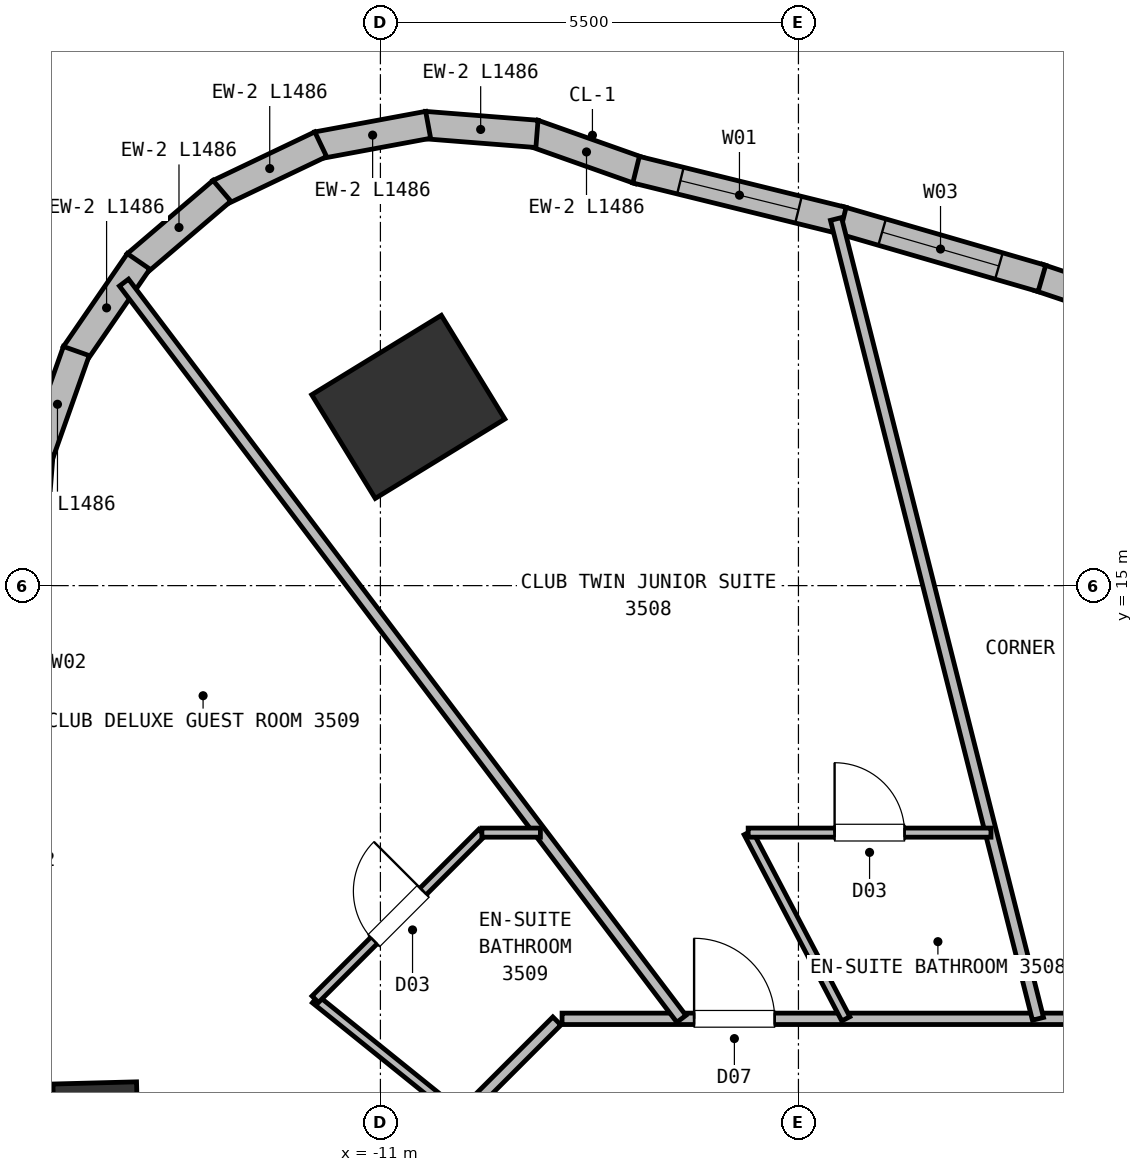
"""IFC4 building model, lengths in metres.
Left out: names, types, materials, properties, quantities, classifications, styles, units other than length and angle.
Written with IfcOpenShell. Run it as: python <this file> out.ifc"""

import sys

from ifc_helpers import new_model, si_unit, direction, frame, frame_2d, origin, origin_2d, place, context, subcontext, project, spatial, rectangle, extrude, element, fill, save


model = new_model("IFC4")
c1 = context("Model", 3, precision=1e-05, world=origin(), true_north=direction((0.0, 1.0)))
c2 = subcontext(c1, "Body", "Model", "MODEL_VIEW")
j1 = project(units=[si_unit("LENGTHUNIT", "METRE"), si_unit("PLANEANGLEUNIT", "RADIAN")], contexts=[c1])
p1 = place(None, origin())
s1 = spatial("IfcSite", under=j1, at=p1, CompositionType="ELEMENT")
p2 = place(p1, origin())
s2 = spatial("IfcBuilding", under=s1, at=p2, CompositionType="ELEMENT")
p3 = place(p2, frame((0.0, 0.0, 131.0)))
s3 = spatial("IfcBuildingStorey", under=s2, at=p3, CompositionType="ELEMENT", Elevation=131.0)
p4 = place(p3, frame((-10.633, 17.352, 0.0), z_axis=(0.0, 0.0, 1.0), x_axis=(-0.522498564716, 0.852640164354, 0.0)))
e1 = element("IfcColumn", 1, at=p4, inside=s3, PredefinedType="COLUMN", context=c2, shape_type="SweptSolid", body=[
    extrude(rectangle(XDim=1.6, YDim=2.0, at=origin_2d()), origin(), (0.0, 0.0, 1.0), 3.75),
])
p5 = place(p3, frame((-14.747, 8.007, 0.0), z_axis=(0.0, 0.0, 1.0), x_axis=(-0.026176948308, 0.999657324976, 0.0)))
e2 = element("IfcColumn", 2, at=p5, inside=s3, PredefinedType="COLUMN", context=c2, shape_type="SweptSolid", body=[
    extrude(rectangle(XDim=0.9, YDim=1.1, at=origin_2d()), origin(), (0.0, 0.0, 1.0), 3.75),
])
for number, where, z_axis, x_axis in (
    (3, (-8.989, 20.954, 0.0), (0.0, 0.0, 1.0), (0.943, -0.334, 0.0)),
    (4, (-10.421, 21.061, 0.0), (0.0, 0.0, 1.0), (0.997, -0.079, 0.0)),
):
    element("IfcWall", number, at=place(p3, frame(where, z_axis=z_axis, x_axis=x_axis)), inside=s3, PredefinedType="SOLIDWALL", context=c2, shape_type="SweptSolid", body=[
        extrude(rectangle(XDim=1.486, YDim=0.36, at=frame_2d((0.743, 0.0))), origin(), (0.0, 0.0, 1.0), 3.5),
    ])
p6 = place(p3, frame((-11.833, 20.792, 0.0), z_axis=(0.0, 0.0, 1.0), x_axis=(0.983262389335, 0.182195152844, 0.0)))
e5 = element("IfcWall", 5, at=p6, inside=s3, PredefinedType="SOLIDWALL", context=c2, shape_type="SweptSolid", body=[
    extrude(rectangle(XDim=1.486, YDim=0.36, at=frame_2d((0.743, 0.0))), origin(), (0.0, 0.0, 1.0), 3.5),
])
for number, where, z_axis, x_axis in (
    (6, (-13.127, 20.168, 0.0), (0.0, 0.0, 1.0), (0.903, 0.431, 0.0)),
    (7, (-14.215, 19.23, 0.0), (0.0, 0.0, 1.0), (0.76, 0.649, 0.0)),
):
    element("IfcWall", number, at=place(p3, frame(where, z_axis=z_axis, x_axis=x_axis)), inside=s3, PredefinedType="SOLIDWALL", context=c2, shape_type="SweptSolid", body=[
        extrude(rectangle(XDim=1.486, YDim=0.36, at=frame_2d((0.743, 0.0))), origin(), (0.0, 0.0, 1.0), 3.5),
    ])
p7 = place(p3, frame((-15.023, 18.042, 0.0), z_axis=(0.0, 0.0, 1.0), x_axis=(0.566438155808, 0.824104250472, 0.0)))
e8 = element("IfcWall", 8, at=p7, inside=s3, PredefinedType="SOLIDWALL", context=c2, shape_type="SweptSolid", body=[
    extrude(rectangle(XDim=1.486, YDim=0.36, at=frame_2d((0.743, 0.0))), origin(), (0.0, 0.0, 1.0), 3.5),
])
p8 = place(p3, frame((-15.497, 16.686, 0.0), z_axis=(0.0, 0.0, 1.0), x_axis=(0.333670746008, 0.942689680254, 0.0)))
e9 = element("IfcWall", 9, at=p8, inside=s3, PredefinedType="SOLIDWALL", context=c2, shape_type="SweptSolid", body=[
    extrude(rectangle(XDim=1.486, YDim=0.36, at=frame_2d((0.743, 0.0))), origin(), (0.0, 0.0, 1.0), 3.5),
])
p9 = place(p3, frame((-15.603, 15.253, 0.0), z_axis=(0.0, 0.0, 1.0), x_axis=(0.078393018091, 0.996922531952, 0.0)))
e10 = element("IfcWall", 10, at=p9, inside=s3, PredefinedType="SOLIDWALL", context=c2, shape_type="SweptSolid", body=[
    extrude(rectangle(XDim=1.486, YDim=0.36, at=frame_2d((0.743, 0.0))), origin(), (0.0, 0.0, 1.0), 3.5),
])
p10 = place(p3, frame((-2.344, 19.057, 0.0), z_axis=(0.0, 0.0, 1.0), x_axis=(0.948124259455, -0.317899966393, 0.0)))
e11 = element("IfcWall", 11, at=p10, inside=s3, PredefinedType="SOLIDWALL", context=c2, shape_type="SweptSolid", body=[
    extrude(rectangle(XDim=2.759, YDim=0.36, at=frame_2d((1.379, 0.0))), origin(), (0.0, 0.0, 1.0), 3.5),
])
p11 = place(p10, frame((0.579, 0.0, 0.72)))
e12 = element("IfcOpeningElement", 12, at=p11, cuts=e11, PredefinedType="OPENING", context=c2, shape_type="SweptSolid", body=[
    extrude(rectangle(XDim=1.6, YDim=1.88, at=frame_2d((0.8, 0.94))), frame((0.0, 0.19, 0.0), z_axis=(0.0, -1.0, 0.0), x_axis=(1.0, 0.0, 0.0)), (0.0, 0.0, 1.0), 0.38),
])
p12 = place(p3, frame((-4.964, 19.815, 0.0), z_axis=(0.0, 0.0, 1.0), x_axis=(0.960441835692, -0.278480664056, 0.0)))
e13 = element("IfcWall", 13, at=p12, inside=s3, PredefinedType="SOLIDWALL", context=c2, shape_type="SweptSolid", body=[
    extrude(rectangle(XDim=2.777, YDim=0.36, at=frame_2d((1.389, 0.0))), origin(), (0.0, 0.0, 1.0), 3.5),
])
p13 = place(p12, frame((0.589, 0.0, 0.72)))
e14 = element("IfcOpeningElement", 14, at=p13, cuts=e13, PredefinedType="OPENING", context=c2, shape_type="SweptSolid", body=[
    extrude(rectangle(XDim=1.6, YDim=1.88, at=frame_2d((0.8, 0.94))), frame((0.0, 0.19, 0.0), z_axis=(0.0, -1.0, 0.0), x_axis=(1.0, 0.0, 0.0)), (0.0, 0.0, 1.0), 0.38),
])
p14 = place(p3, frame((-7.636, 20.472, 0.0), z_axis=(0.0, 0.0, 1.0), x_axis=(0.970982505779, -0.239150524716, 0.0)))
e15 = element("IfcWall", 15, at=p14, inside=s3, PredefinedType="SOLIDWALL", context=c2, shape_type="SweptSolid", body=[
    extrude(rectangle(XDim=2.801, YDim=0.36, at=frame_2d((1.401, 0.0))), origin(), (0.0, 0.0, 1.0), 3.5),
])
p15 = place(p14, frame((0.601, 0.0, 0.72)))
e16 = element("IfcOpeningElement", 16, at=p15, cuts=e15, PredefinedType="OPENING", context=c2, shape_type="SweptSolid", body=[
    extrude(rectangle(XDim=1.6, YDim=1.88, at=frame_2d((0.8, 0.94))), frame((0.0, 0.19, 0.0), z_axis=(0.0, -1.0, 0.0), x_axis=(1.0, 0.0, 0.0)), (0.0, 0.0, 1.0), 0.38),
])
p16 = place(p3, frame((-8.61, 9.3, 0.0), z_axis=(0.0, 0.0, 1.0), x_axis=(1.0, 0.0, 0.0)))
e17 = element("IfcWall", 17, at=p16, inside=s3, PredefinedType="PARTITIONING", context=c2, shape_type="SweptSolid", body=[
    extrude(rectangle(XDim=17.22, YDim=0.15, at=frame_2d((8.61, 0.0))), origin(), (0.0, 0.0, 1.0), 3.5),
])
p17 = place(p16, frame((11.156, 0.0, 0.0)))
e18 = element("IfcOpeningElement", 18, at=p17, cuts=e17, PredefinedType="OPENING", context=c2, shape_type="SweptSolid", body=[
    extrude(rectangle(XDim=1.0, YDim=2.15, at=frame_2d((0.5, 1.075))), frame((0.0, 0.085, 0.0), z_axis=(0.0, -1.0, 0.0), x_axis=(1.0, 0.0, 0.0)), (0.0, 0.0, 1.0), 0.17),
])
p18 = place(p16, frame((6.799, 0.0, 0.0)))
e19 = element("IfcOpeningElement", 19, at=p18, cuts=e17, PredefinedType="OPENING", context=c2, shape_type="SweptSolid", body=[
    extrude(rectangle(XDim=1.06, YDim=2.15, at=frame_2d((0.53, 1.075))), frame((0.0, 0.085, 0.0), z_axis=(0.0, -1.0, 0.0), x_axis=(1.0, 0.0, 0.0)), (0.0, 0.0, 1.0), 0.17),
])
p19 = place(p16, frame((1.737, 0.0, 0.0)))
e20 = element("IfcOpeningElement", 20, at=p19, cuts=e17, PredefinedType="OPENING", context=c2, shape_type="SweptSolid", body=[
    extrude(rectangle(XDim=1.06, YDim=2.15, at=frame_2d((0.53, 1.075))), frame((0.0, 0.085, 0.0), z_axis=(0.0, -1.0, 0.0), x_axis=(1.0, 0.0, 0.0)), (0.0, 0.0, 1.0), 0.17),
])
p20 = place(p16, frame((8.48, 0.0, 0.0)))
e21 = element("IfcOpeningElement", 21, at=p20, cuts=e17, PredefinedType="OPENING", context=c2, shape_type="SweptSolid", body=[
    extrude(rectangle(XDim=1.0, YDim=2.15, at=frame_2d((0.5, 1.075))), frame((0.0, 0.085, 0.0), z_axis=(0.0, -1.0, 0.0), x_axis=(1.0, 0.0, 0.0)), (0.0, 0.0, 1.0), 0.17),
])
p21 = place(p3, frame((-10.722, 7.228, 0.0), z_axis=(0.0, 0.0, 1.0), x_axis=(0.707106781187, 0.707106781187, 0.0)))
e22 = element("IfcWall", 22, at=p21, inside=s3, PredefinedType="PARTITIONING", context=c2, shape_type="SweptSolid", body=[
    extrude(rectangle(XDim=2.89, YDim=0.15, at=frame_2d((1.445, 0.0))), origin(), (0.0, 0.0, 1.0), 3.5),
])
p22 = place(p3, frame((-2.348, 9.3, 0.0), z_axis=(0.0, 0.0, 1.0), x_axis=(-0.244821157428, 0.969568254882, 0.0)))
e23 = element("IfcWall", 23, at=p22, inside=s3, PredefinedType="PARTITIONING", context=c2, shape_type="SweptSolid", body=[
    extrude(rectangle(XDim=10.855, YDim=0.15, at=frame_2d((5.427, 0.0))), origin(), (0.0, 0.0, 1.0), 3.5),
])
p23 = place(p3, frame((-6.161, 11.75, 0.0), z_axis=(0.0, 0.0, 1.0), x_axis=(0.464392787292, -0.885629346347, 0.0)))
e24 = element("IfcWall", 24, at=p23, inside=s3, PredefinedType="PARTITIONING", context=c2, shape_type="SweptSolid", body=[
    extrude(rectangle(XDim=2.766, YDim=0.12, at=frame_2d((1.383, 0.0))), origin(), (0.0, 0.0, 1.0), 3.5),
])
p24 = place(p3, frame((-6.161, 11.75, 0.0), z_axis=(0.0, 0.0, 1.0), x_axis=(1.0, 0.0, 0.0)))
e25 = element("IfcWall", 25, at=p24, inside=s3, PredefinedType="PARTITIONING", context=c2, shape_type="SweptSolid", body=[
    extrude(rectangle(XDim=3.194, YDim=0.12, at=frame_2d((1.597, 0.0))), origin(), (0.0, 0.0, 1.0), 3.5),
])
p25 = place(p24, frame((1.137, 0.0, 0.0)))
e26 = element("IfcOpeningElement", 26, at=p25, cuts=e25, PredefinedType="OPENING", context=c2, shape_type="SweptSolid", body=[
    extrude(rectangle(XDim=0.92, YDim=2.1, at=frame_2d((0.46, 1.05))), frame((0.0, 0.07, 0.0), z_axis=(0.0, -1.0, 0.0), x_axis=(1.0, 0.0, 0.0)), (0.0, 0.0, 1.0), 0.14),
])
p26 = place(p3, frame((-7.04, 9.3, 0.0), z_axis=(0.0, 0.0, 1.0), x_axis=(-0.603569047372, 0.797310733061, 0.0)))
e27 = element("IfcWall", 27, at=p26, inside=s3, PredefinedType="PARTITIONING", context=c2, shape_type="SweptSolid", body=[
    extrude(rectangle(XDim=12.15, YDim=0.15, at=frame_2d((6.075, 0.0))), origin(), (0.0, 0.0, 1.0), 3.5),
])
p27 = place(p3, frame((-11.857, 9.558, 0.0), z_axis=(0.0, 0.0, 1.0), x_axis=(0.778601964437, -0.627518112069, 0.0)))
e28 = element("IfcWall", 28, at=p27, inside=s3, PredefinedType="PARTITIONING", context=c2, shape_type="SweptSolid", body=[
    extrude(rectangle(XDim=2.464, YDim=0.12, at=frame_2d((1.232, 0.0))), origin(), (0.0, 0.0, 1.0), 3.5),
])
p28 = place(p3, frame((-11.857, 9.558, 0.0), z_axis=(0.0, 0.0, 1.0), x_axis=(0.7071461491, 0.707067411081, 0.0)))
e29 = element("IfcWall", 29, at=p28, inside=s3, PredefinedType="PARTITIONING", context=c2, shape_type="SweptSolid", body=[
    extrude(rectangle(XDim=3.101, YDim=0.12, at=frame_2d((1.55, 0.0))), origin(), (0.0, 0.0, 1.0), 3.5),
])
p29 = place(p28, frame((1.09, 0.0, 0.0)))
e30 = element("IfcOpeningElement", 30, at=p29, cuts=e29, PredefinedType="OPENING", context=c2, shape_type="SweptSolid", body=[
    extrude(rectangle(XDim=0.92, YDim=2.1, at=frame_2d((0.46, 1.05))), frame((0.0, 0.07, 0.0), z_axis=(0.0, -1.0, 0.0), x_axis=(1.0, 0.0, 0.0)), (0.0, 0.0, 1.0), 0.14),
])
p30 = place(p3, frame((-8.895, 11.75, 0.0), z_axis=(0.0, 0.0, 1.0), x_axis=(-1.0, 0.0, 0.0)))
e31 = element("IfcWall", 31, at=p30, inside=s3, PredefinedType="PARTITIONING", context=c2, shape_type="SweptSolid", body=[
    extrude(rectangle(XDim=0.77, YDim=0.12, at=frame_2d((0.385, 0.0))), origin(), (0.0, 0.0, 1.0), 3.5),
])
p31 = place(p13, origin())
e32 = element("IfcWindow", 32, at=p31, inside=s3, PartitioningType="SINGLE_PANEL", PredefinedType="WINDOW", context=c2, shape_type="SweptSolid", body=[
    extrude(rectangle(XDim=1.6, YDim=1.88, at=frame_2d((0.8, 0.94))), frame((0.0, 0.03, 0.0), z_axis=(0.0, -1.0, 0.0), x_axis=(1.0, 0.0, 0.0)), (0.0, 0.0, 1.0), 0.06),
])
fill(e14, e32)
p32 = place(p15, origin())
e33 = element("IfcWindow", 33, at=p32, inside=s3, PartitioningType="SINGLE_PANEL", PredefinedType="WINDOW", context=c2, shape_type="SweptSolid", body=[
    extrude(rectangle(XDim=1.6, YDim=1.88, at=frame_2d((0.8, 0.94))), frame((0.0, 0.03, 0.0), z_axis=(0.0, -1.0, 0.0), x_axis=(1.0, 0.0, 0.0)), (0.0, 0.0, 1.0), 0.06),
])
fill(e16, e33)
p33 = place(p25, origin())
e34 = element("IfcDoor", 34, at=p33, inside=s3, OperationType="SINGLE_SWING_LEFT", PredefinedType="DOOR", context=c2, shape_type="SweptSolid", body=[
    extrude(rectangle(XDim=0.92, YDim=2.1, at=frame_2d((0.46, 1.05))), frame((0.0, 0.025, 0.0), z_axis=(0.0, -1.0, 0.0), x_axis=(1.0, 0.0, 0.0)), (0.0, 0.0, 1.0), 0.05),
])
fill(e26, e34)
p34 = place(p29, origin())
e35 = element("IfcDoor", 35, at=p34, inside=s3, OperationType="SINGLE_SWING_RIGHT", PredefinedType="DOOR", context=c2, shape_type="SweptSolid", body=[
    extrude(rectangle(XDim=0.92, YDim=2.1, at=frame_2d((0.46, 1.05))), frame((0.0, 0.025, 0.0), z_axis=(0.0, -1.0, 0.0), x_axis=(1.0, 0.0, 0.0)), (0.0, 0.0, 1.0), 0.05),
])
fill(e30, e35)
p35 = place(p19, origin())
e36 = element("IfcDoor", 36, at=p35, inside=s3, OperationType="SINGLE_SWING_LEFT", PredefinedType="DOOR", context=c2, shape_type="SweptSolid", body=[
    extrude(rectangle(XDim=1.06, YDim=2.15, at=frame_2d((0.53, 1.075))), frame((0.0, 0.025, 0.0), z_axis=(0.0, -1.0, 0.0), x_axis=(1.0, 0.0, 0.0)), (0.0, 0.0, 1.0), 0.05),
])
fill(e20, e36)
save(model, sys.argv[1])
